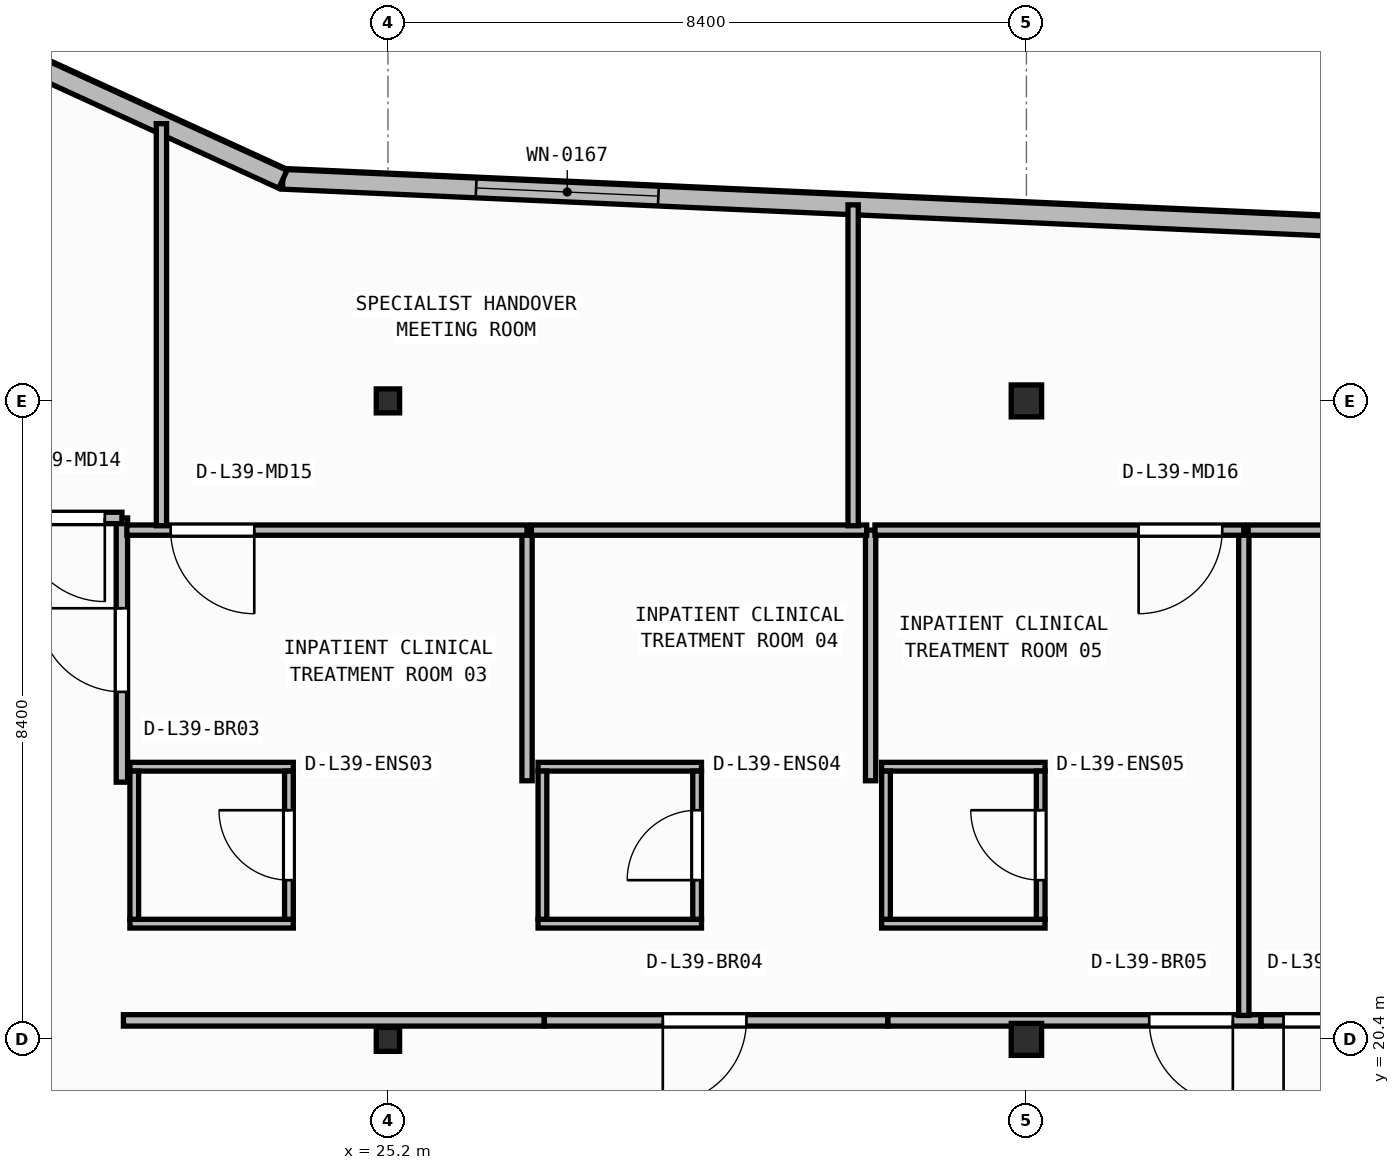
"""IFC4 building model, lengths in metres.
Left out: names, types, materials, properties, quantities, classifications, styles, units other than length and angle.
Written with IfcOpenShell. Run it as: python <this file> out.ifc"""

import sys

from ifc_helpers import new_model, si_unit, direction, frame, frame_2d, origin, origin_2d, place, context, subcontext, project, spatial, rectangle, i_section, extrude, element, fill, save


model = new_model("IFC4")
c1 = context("Model", 3, precision=1e-05, world=origin(), true_north=direction((0.0, 1.0)))
c2 = subcontext(c1, "Body", "Model", "MODEL_VIEW")
j1 = project(units=[si_unit("LENGTHUNIT", "METRE"), si_unit("PLANEANGLEUNIT", "RADIAN")], contexts=[c1])
p1 = place(None, origin())
s1 = spatial("IfcSite", under=j1, at=p1, CompositionType="ELEMENT")
p2 = place(p1, origin())
s2 = spatial("IfcBuilding", under=s1, at=p2, CompositionType="ELEMENT")
p3 = place(p2, frame((0.0, 0.0, 158.65)))
s3 = spatial("IfcBuildingStorey", under=s2, at=p3, CompositionType="ELEMENT", Elevation=158.65)
p4 = place(p3, frame((25.2, 20.4, 0.0), z_axis=(0.0, 0.0, 1.0), x_axis=(1.0, 0.0, 0.0)))
e1 = element("IfcColumn", 1, at=p4, inside=s3, PredefinedType="COLUMN", context=c2, shape_type="SweptSolid", body=[
    extrude(i_section(OverallWidth=0.307, OverallDepth=0.315, WebThickness=0.012, FlangeThickness=0.019, FilletRadius=0.017, at=origin_2d()), origin(), (0.0, 0.0, 1.0), 3.95),
])
p5 = place(p3, frame((33.6, 20.4, 0.0), z_axis=(0.0, 0.0, 1.0), x_axis=(1.0, 0.0, 0.0)))
e2 = element("IfcColumn", 2, at=p5, inside=s3, PredefinedType="COLUMN", context=c2, shape_type="SweptSolid", body=[
    extrude(i_section(OverallWidth=0.4, OverallDepth=0.42, WebThickness=0.025, FlangeThickness=0.04, at=origin_2d()), origin(), (0.0, 0.0, 1.0), 3.95),
])
p6 = place(p3, frame((25.2, 28.8, 0.0), z_axis=(0.0, 0.0, 1.0), x_axis=(1.0, 0.0, 0.0)))
e3 = element("IfcColumn", 3, at=p6, inside=s3, PredefinedType="COLUMN", context=c2, shape_type="SweptSolid", body=[
    extrude(i_section(OverallWidth=0.307, OverallDepth=0.315, WebThickness=0.012, FlangeThickness=0.019, FilletRadius=0.017, at=origin_2d()), origin(), (0.0, 0.0, 1.0), 3.95),
])
p7 = place(p3, frame((33.6, 28.8, 0.0), z_axis=(0.0, 0.0, 1.0), x_axis=(1.0, 0.0, 0.0)))
e4 = element("IfcColumn", 4, at=p7, inside=s3, PredefinedType="COLUMN", context=c2, shape_type="SweptSolid", body=[
    extrude(i_section(OverallWidth=0.4, OverallDepth=0.42, WebThickness=0.025, FlangeThickness=0.04, at=origin_2d()), origin(), (0.0, 0.0, 1.0), 3.95),
])
p8 = place(p3, frame((38.63, 31.052, 0.0), z_axis=(0.0, 0.0, 1.0), x_axis=(-0.998996592956, 0.044786239663, 0.0)))
e5 = element("IfcWall", 5, at=p8, inside=s3, PredefinedType="STANDARD", context=c2, shape_type="SweptSolid", body=[
    extrude(rectangle(XDim=14.827, YDim=0.26, at=frame_2d((7.414, 0.0))), origin(), (0.0, 0.0, 1.0), 3.71),
])
p9 = place(p8, frame((9.882, 0.0, 0.9)))
e6 = element("IfcOpeningElement", 6, at=p9, cuts=e5, PredefinedType="OPENING", context=c2, shape_type="SweptSolid", body=[
    extrude(rectangle(XDim=2.4, YDim=1.65, at=frame_2d((1.2, 0.825))), frame((0.0, 0.14, 0.0), z_axis=(0.0, -1.0, 0.0), x_axis=(1.0, 0.0, 0.0)), (0.0, 0.0, 1.0), 0.28),
])
p10 = place(p3, frame((23.818, 31.716, 0.0), z_axis=(0.0, 0.0, 1.0), x_axis=(-0.909209527513, 0.416338846471, 0.0)))
e7 = element("IfcWall", 7, at=p10, inside=s3, PredefinedType="STANDARD", context=c2, shape_type="SweptSolid", body=[
    extrude(rectangle(XDim=13.787, YDim=0.26, at=frame_2d((6.894, 0.0))), origin(), (0.0, 0.0, 1.0), 3.71),
])
p11 = place(p10, frame((3.829, 0.0, 0.9)))
e8 = element("IfcOpeningElement", 8, at=p11, cuts=e7, PredefinedType="OPENING", context=c2, shape_type="SweptSolid", body=[
    extrude(rectangle(XDim=2.4, YDim=1.65, at=frame_2d((1.2, 0.825))), frame((0.0, 0.14, 0.0), z_axis=(0.0, -1.0, 0.0), x_axis=(1.0, 0.0, 0.0)), (0.0, 0.0, 1.0), 0.28),
])
for number, where, z_axis, x_axis in (
    (9, (21.805, 21.923, 0.0), (0.0, 0.0, 1.0), (1.0, 0.0, 0.0)),
    (10, (21.805, 23.988, 0.0), (0.0, 0.0, 1.0), (1.0, 0.0, 0.0)),
):
    element("IfcWall", number, at=place(p3, frame(where, z_axis=z_axis, x_axis=x_axis)), inside=s3, PredefinedType="PARTITIONING", context=c2, shape_type="SweptSolid", body=[
        extrude(rectangle(XDim=2.15, YDim=0.115, at=frame_2d((1.075, 0.0))), origin(), (0.0, 0.0, 1.0), 3.71),
    ])
p12 = place(p3, frame((21.863, 21.98, 0.0), z_axis=(0.0, 0.0, 1.0), x_axis=(0.0, 1.0, 0.0)))
e11 = element("IfcWall", 11, at=p12, inside=s3, PredefinedType="PARTITIONING", context=c2, shape_type="SweptSolid", body=[
    extrude(rectangle(XDim=1.95, YDim=0.115, at=frame_2d((0.975, 0.0))), origin(), (0.0, 0.0, 1.0), 3.71),
])
p13 = place(p3, frame((23.897, 21.98, 0.0), z_axis=(0.0, 0.0, 1.0), x_axis=(0.0, 1.0, 0.0)))
e12 = element("IfcWall", 12, at=p13, inside=s3, PredefinedType="PARTITIONING", context=c2, shape_type="SweptSolid", body=[
    extrude(rectangle(XDim=1.95, YDim=0.115, at=frame_2d((0.975, 0.0))), origin(), (0.0, 0.0, 1.0), 3.71),
])
p14 = place(p13, frame((0.515, 0.0, 0.0)))
e13 = element("IfcOpeningElement", 13, at=p14, cuts=e12, PredefinedType="OPENING", context=c2, shape_type="SweptSolid", body=[
    extrude(rectangle(XDim=0.92, YDim=2.1, at=frame_2d((0.46, 1.05))), frame((0.0, 0.067, 0.0), z_axis=(0.0, -1.0, 0.0), x_axis=(1.0, 0.0, 0.0)), (0.0, 0.0, 1.0), 0.135),
])
for number, where, z_axis, x_axis in (
    (14, (27.175, 21.923, 0.0), (0.0, 0.0, 1.0), (1.0, 0.0, 0.0)),
    (15, (27.175, 23.988, 0.0), (0.0, 0.0, 1.0), (1.0, 0.0, 0.0)),
):
    element("IfcWall", number, at=place(p3, frame(where, z_axis=z_axis, x_axis=x_axis)), inside=s3, PredefinedType="PARTITIONING", context=c2, shape_type="SweptSolid", body=[
        extrude(rectangle(XDim=2.15, YDim=0.115, at=frame_2d((1.075, 0.0))), origin(), (0.0, 0.0, 1.0), 3.71),
    ])
p15 = place(p3, frame((27.232, 21.98, 0.0), z_axis=(0.0, 0.0, 1.0), x_axis=(0.0, 1.0, 0.0)))
e16 = element("IfcWall", 16, at=p15, inside=s3, PredefinedType="PARTITIONING", context=c2, shape_type="SweptSolid", body=[
    extrude(rectangle(XDim=1.95, YDim=0.115, at=frame_2d((0.975, 0.0))), origin(), (0.0, 0.0, 1.0), 3.71),
])
p16 = place(p3, frame((29.268, 21.98, 0.0), z_axis=(0.0, 0.0, 1.0), x_axis=(0.0, 1.0, 0.0)))
e17 = element("IfcWall", 17, at=p16, inside=s3, PredefinedType="PARTITIONING", context=c2, shape_type="SweptSolid", body=[
    extrude(rectangle(XDim=1.95, YDim=0.115, at=frame_2d((0.975, 0.0))), origin(), (0.0, 0.0, 1.0), 3.71),
])
p17 = place(p16, frame((0.515, 0.0, 0.0)))
e18 = element("IfcOpeningElement", 18, at=p17, cuts=e17, PredefinedType="OPENING", context=c2, shape_type="SweptSolid", body=[
    extrude(rectangle(XDim=0.92, YDim=2.1, at=frame_2d((0.46, 1.05))), frame((0.0, 0.067, 0.0), z_axis=(0.0, -1.0, 0.0), x_axis=(1.0, 0.0, 0.0)), (0.0, 0.0, 1.0), 0.135),
])
for number, where, z_axis, x_axis in (
    (19, (31.695, 21.923, 0.0), (0.0, 0.0, 1.0), (1.0, 0.0, 0.0)),
    (20, (31.695, 23.988, 0.0), (0.0, 0.0, 1.0), (1.0, 0.0, 0.0)),
):
    element("IfcWall", number, at=place(p3, frame(where, z_axis=z_axis, x_axis=x_axis)), inside=s3, PredefinedType="PARTITIONING", context=c2, shape_type="SweptSolid", body=[
        extrude(rectangle(XDim=2.15, YDim=0.115, at=frame_2d((1.075, 0.0))), origin(), (0.0, 0.0, 1.0), 3.71),
    ])
p18 = place(p3, frame((31.752, 21.98, 0.0), z_axis=(0.0, 0.0, 1.0), x_axis=(0.0, 1.0, 0.0)))
e21 = element("IfcWall", 21, at=p18, inside=s3, PredefinedType="PARTITIONING", context=c2, shape_type="SweptSolid", body=[
    extrude(rectangle(XDim=1.95, YDim=0.115, at=frame_2d((0.975, 0.0))), origin(), (0.0, 0.0, 1.0), 3.71),
])
p19 = place(p3, frame((33.788, 21.98, 0.0), z_axis=(0.0, 0.0, 1.0), x_axis=(0.0, 1.0, 0.0)))
e22 = element("IfcWall", 22, at=p19, inside=s3, PredefinedType="PARTITIONING", context=c2, shape_type="SweptSolid", body=[
    extrude(rectangle(XDim=1.95, YDim=0.115, at=frame_2d((0.975, 0.0))), origin(), (0.0, 0.0, 1.0), 3.152),
])
p20 = place(p19, frame((0.515, 0.0, 0.0)))
e23 = element("IfcOpeningElement", 23, at=p20, cuts=e22, PredefinedType="OPENING", context=c2, shape_type="SweptSolid", body=[
    extrude(rectangle(XDim=0.92, YDim=2.1, at=frame_2d((0.46, 1.05))), frame((0.0, 0.067, 0.0), z_axis=(0.0, -1.0, 0.0), x_axis=(1.0, 0.0, 0.0)), (0.0, 0.0, 1.0), 0.135),
])
p21 = place(p3, frame((21.7, 23.784, 0.0), z_axis=(0.0, 0.0, 1.0), x_axis=(0.0, 1.0, 0.0)))
e24 = element("IfcWall", 24, at=p21, inside=s3, PredefinedType="PARTITIONING", context=c2, shape_type="SweptSolid", body=[
    extrude(rectangle(XDim=3.476, YDim=0.15, at=frame_2d((1.738, 0.0))), origin(), (0.0, 0.0, 1.0), 3.71),
])
p22 = place(p21, frame((1.188, 0.0, 0.0)))
e25 = element("IfcOpeningElement", 25, at=p22, cuts=e24, PredefinedType="OPENING", context=c2, shape_type="SweptSolid", body=[
    extrude(rectangle(XDim=1.1, YDim=2.1, at=frame_2d((0.55, 1.05))), frame((0.0, 0.085, 0.0), z_axis=(0.0, -1.0, 0.0), x_axis=(1.0, 0.0, 0.0)), (0.0, 0.0, 1.0), 0.17),
])
p23 = place(p3, frame((21.7, 27.26, 0.0), z_axis=(0.0, 0.0, 1.0), x_axis=(-1.0, 0.0, 0.0)))
e26 = element("IfcWall", 26, at=p23, inside=s3, PredefinedType="PARTITIONING", context=c2, shape_type="SweptSolid", body=[
    extrude(rectangle(XDim=2.5, YDim=0.15, at=frame_2d((1.25, 0.0))), origin(), (0.0, 0.0, 1.0), 3.71),
])
p24 = place(p23, frame((0.225, 0.0, 0.0)))
e27 = element("IfcOpeningElement", 27, at=p24, cuts=e26, PredefinedType="OPENING", context=c2, shape_type="SweptSolid", body=[
    extrude(rectangle(XDim=1.1, YDim=2.1, at=frame_2d((0.55, 1.05))), frame((0.0, 0.085, 0.0), z_axis=(0.0, -1.0, 0.0), x_axis=(1.0, 0.0, 0.0)), (0.0, 0.0, 1.0), 0.17),
])
p25 = place(p3, frame((27.256, 20.65, 0.0), z_axis=(0.0, 0.0, 1.0), x_axis=(-1.0, 0.0, 0.0)))
e28 = element("IfcWall", 28, at=p25, inside=s3, PredefinedType="PARTITIONING", context=c2, shape_type="SweptSolid", body=[
    extrude(rectangle(XDim=5.536, YDim=0.15, at=frame_2d((2.768, 0.0))), origin(), (0.0, 0.0, 1.0), 3.083),
])
p26 = place(p3, frame((31.776, 20.65, 0.0), z_axis=(0.0, 0.0, 1.0), x_axis=(-1.0, 0.0, 0.0)))
e29 = element("IfcWall", 29, at=p26, inside=s3, PredefinedType="PARTITIONING", context=c2, shape_type="SweptSolid", body=[
    extrude(rectangle(XDim=4.518, YDim=0.15, at=frame_2d((2.259, 0.0))), origin(), (0.0, 0.0, 1.0), 3.083),
])
p27 = place(p26, frame((1.86, 0.0, 0.0)))
e30 = element("IfcOpeningElement", 30, at=p27, cuts=e29, PredefinedType="OPENING", context=c2, shape_type="SweptSolid", body=[
    extrude(rectangle(XDim=1.1, YDim=2.1, at=frame_2d((0.55, 1.05))), frame((0.0, 0.085, 0.0), z_axis=(0.0, -1.0, 0.0), x_axis=(1.0, 0.0, 0.0)), (0.0, 0.0, 1.0), 0.17),
])
p28 = place(p3, frame((36.686, 20.65, 0.0), z_axis=(0.0, 0.0, 1.0), x_axis=(-1.0, 0.0, 0.0)))
e31 = element("IfcWall", 31, at=p28, inside=s3, PredefinedType="PARTITIONING", context=c2, shape_type="SweptSolid", body=[
    extrude(rectangle(XDim=4.908, YDim=0.15, at=frame_2d((2.454, 0.0))), origin(), (0.0, 0.0, 1.0), 3.083),
])
p29 = place(p28, frame((0.37, 0.0, 0.0)))
e32 = element("IfcOpeningElement", 32, at=p29, cuts=e31, PredefinedType="OPENING", context=c2, shape_type="SweptSolid", body=[
    extrude(rectangle(XDim=1.1, YDim=2.1, at=frame_2d((0.55, 1.05))), frame((0.0, 0.085, 0.0), z_axis=(0.0, -1.0, 0.0), x_axis=(1.0, 0.0, 0.0)), (0.0, 0.0, 1.0), 0.17),
])
p30 = place(p3, frame((41.996, 20.65, 0.0), z_axis=(0.0, 0.0, 1.0), x_axis=(-1.0, 0.0, 0.0)))
e33 = element("IfcWall", 33, at=p30, inside=s3, PredefinedType="PARTITIONING", context=c2, shape_type="SweptSolid", body=[
    extrude(rectangle(XDim=5.308, YDim=0.15, at=frame_2d((2.654, 0.0))), origin(), (0.0, 0.0, 1.0), 3.083),
])
p31 = place(p30, frame((3.913, 0.0, 0.0)))
e34 = element("IfcOpeningElement", 34, at=p31, cuts=e33, PredefinedType="OPENING", context=c2, shape_type="SweptSolid", body=[
    extrude(rectangle(XDim=1.1, YDim=2.1, at=frame_2d((0.55, 1.05))), frame((0.0, 0.085, 0.0), z_axis=(0.0, -1.0, 0.0), x_axis=(1.0, 0.0, 0.0)), (0.0, 0.0, 1.0), 0.17),
])
p32 = place(p3, frame((27.03, 23.802, 0.0), z_axis=(0.0, 0.0, 1.0), x_axis=(0.0, 1.0, 0.0)))
e35 = element("IfcWall", 35, at=p32, inside=s3, PredefinedType="PARTITIONING", context=c2, shape_type="SweptSolid", body=[
    extrude(rectangle(XDim=3.298, YDim=0.135, at=frame_2d((1.649, 0.0))), origin(), (0.0, 0.0, 1.0), 3.71),
])
p33 = place(p3, frame((27.03, 27.1, 0.0), z_axis=(0.0, 0.0, 1.0), x_axis=(-1.0, 0.0, 0.0)))
e36 = element("IfcWall", 36, at=p33, inside=s3, PredefinedType="PARTITIONING", context=c2, shape_type="SweptSolid", body=[
    extrude(rectangle(XDim=5.265, YDim=0.135, at=frame_2d((2.633, 0.0))), origin(), (0.0, 0.0, 1.0), 3.71),
])
p34 = place(p33, frame((3.588, 0.0, 0.0)))
e37 = element("IfcOpeningElement", 37, at=p34, cuts=e36, PredefinedType="OPENING", context=c2, shape_type="SweptSolid", body=[
    extrude(rectangle(XDim=1.1, YDim=2.1, at=frame_2d((0.55, 1.05))), frame((0.0, 0.077, 0.0), z_axis=(0.0, -1.0, 0.0), x_axis=(1.0, 0.0, 0.0)), (0.0, 0.0, 1.0), 0.155),
])
p35 = place(p3, frame((31.55, 23.802, 0.0), z_axis=(0.0, 0.0, 1.0), x_axis=(0.0, 1.0, 0.0)))
e38 = element("IfcWall", 38, at=p35, inside=s3, PredefinedType="PARTITIONING", context=c2, shape_type="SweptSolid", body=[
    extrude(rectangle(XDim=3.298, YDim=0.135, at=frame_2d((1.649, 0.0))), origin(), (0.0, 0.0, 1.0), 3.71),
])
p36 = place(p3, frame((31.499, 27.1, 0.0), z_axis=(0.0, 0.0, 1.0), x_axis=(-1.0, 0.0, 0.0)))
e39 = element("IfcWall", 39, at=p36, inside=s3, PredefinedType="PARTITIONING", context=c2, shape_type="SweptSolid", body=[
    extrude(rectangle(XDim=4.411, YDim=0.135, at=frame_2d((2.206, 0.0))), origin(), (0.0, 0.0, 1.0), 3.71),
])
p37 = place(p3, frame((36.46, 20.715, 0.0), z_axis=(0.0, 0.0, 1.0), x_axis=(0.0, 1.0, 0.0)))
e40 = element("IfcWall", 40, at=p37, inside=s3, PredefinedType="PARTITIONING", context=c2, shape_type="SweptSolid", body=[
    extrude(rectangle(XDim=6.385, YDim=0.135, at=frame_2d((3.192, 0.0))), origin(), (0.0, 0.0, 1.0), 3.71),
])
p38 = place(p3, frame((36.46, 27.1, 0.0), z_axis=(0.0, 0.0, 1.0), x_axis=(-1.0, 0.0, 0.0)))
e41 = element("IfcWall", 41, at=p38, inside=s3, PredefinedType="PARTITIONING", context=c2, shape_type="SweptSolid", body=[
    extrude(rectangle(XDim=4.853, YDim=0.135, at=frame_2d((2.426, 0.0))), origin(), (0.0, 0.0, 1.0), 3.71),
])
p39 = place(p38, frame((0.284, 0.0, 0.0)))
e42 = element("IfcOpeningElement", 42, at=p39, cuts=e41, PredefinedType="OPENING", context=c2, shape_type="SweptSolid", body=[
    extrude(rectangle(XDim=1.1, YDim=2.1, at=frame_2d((0.55, 1.05))), frame((0.0, 0.077, 0.0), z_axis=(0.0, -1.0, 0.0), x_axis=(1.0, 0.0, 0.0)), (0.0, 0.0, 1.0), 0.155),
])
p40 = place(p3, frame((41.77, 27.1, 0.0), z_axis=(0.0, 0.0, 1.0), x_axis=(-1.0, 0.0, 0.0)))
e43 = element("IfcWall", 43, at=p40, inside=s3, PredefinedType="PARTITIONING", context=c2, shape_type="SweptSolid", body=[
    extrude(rectangle(XDim=5.252, YDim=0.135, at=frame_2d((2.626, 0.0))), origin(), (0.0, 0.0, 1.0), 3.71),
])
p41 = place(p3, frame((22.22, 27.157, 0.0), z_axis=(0.0, 0.0, 1.0), x_axis=(0.0, 1.0, 0.0)))
e44 = element("IfcWall", 44, at=p41, inside=s3, PredefinedType="PARTITIONING", context=c2, shape_type="SweptSolid", body=[
    extrude(rectangle(XDim=5.29, YDim=0.135, at=frame_2d((2.645, 0.0))), origin(), (0.0, 0.0, 1.0), 3.71),
])
p42 = place(p3, frame((31.32, 27.157, 0.0), z_axis=(0.0, 0.0, 1.0), x_axis=(0.0, 1.0, 0.0)))
e45 = element("IfcWall", 45, at=p42, inside=s3, PredefinedType="PARTITIONING", context=c2, shape_type="SweptSolid", body=[
    extrude(rectangle(XDim=4.222, YDim=0.135, at=frame_2d((2.111, 0.0))), origin(), (0.0, 0.0, 1.0), 3.71),
])
p43 = place(p9, origin())
e46 = element("IfcWindow", 46, at=p43, inside=s3, PartitioningType="SINGLE_PANEL", PredefinedType="WINDOW", context=c2, shape_type="SweptSolid", body=[
    extrude(rectangle(XDim=2.4, YDim=1.65, at=frame_2d((1.2, 0.825))), frame((0.0, 0.03, 0.0), z_axis=(0.0, -1.0, 0.0), x_axis=(1.0, 0.0, 0.0)), (0.0, 0.0, 1.0), 0.06),
])
fill(e6, e46)
p44 = place(p14, origin())
e47 = element("IfcDoor", 47, at=p44, inside=s3, OperationType="SINGLE_SWING_RIGHT", PredefinedType="DOOR", context=c2, shape_type="SweptSolid", body=[
    extrude(rectangle(XDim=0.92, YDim=2.1, at=frame_2d((0.46, 1.05))), frame((0.0, 0.025, 0.0), z_axis=(0.0, -1.0, 0.0), x_axis=(1.0, 0.0, 0.0)), (0.0, 0.0, 1.0), 0.05),
])
fill(e13, e47)
p45 = place(p17, origin())
e48 = element("IfcDoor", 48, at=p45, inside=s3, OperationType="SINGLE_SWING_LEFT", PredefinedType="DOOR", context=c2, shape_type="SweptSolid", body=[
    extrude(rectangle(XDim=0.92, YDim=2.1, at=frame_2d((0.46, 1.05))), frame((0.0, 0.025, 0.0), z_axis=(0.0, -1.0, 0.0), x_axis=(1.0, 0.0, 0.0)), (0.0, 0.0, 1.0), 0.05),
])
fill(e18, e48)
p46 = place(p20, origin())
e49 = element("IfcDoor", 49, at=p46, inside=s3, OperationType="SINGLE_SWING_RIGHT", PredefinedType="DOOR", context=c2, shape_type="SweptSolid", body=[
    extrude(rectangle(XDim=0.92, YDim=2.1, at=frame_2d((0.46, 1.05))), frame((0.0, 0.025, 0.0), z_axis=(0.0, -1.0, 0.0), x_axis=(1.0, 0.0, 0.0)), (0.0, 0.0, 1.0), 0.05),
])
fill(e23, e49)
p47 = place(p22, origin())
e50 = element("IfcDoor", 50, at=p47, inside=s3, OperationType="SINGLE_SWING_RIGHT", PredefinedType="DOOR", context=c2, shape_type="SweptSolid", body=[
    extrude(rectangle(XDim=1.1, YDim=2.1, at=frame_2d((0.55, 1.05))), frame((0.0, 0.025, 0.0), z_axis=(0.0, -1.0, 0.0), x_axis=(1.0, 0.0, 0.0)), (0.0, 0.0, 1.0), 0.05),
])
fill(e25, e50)
p48 = place(p24, origin())
e51 = element("IfcDoor", 51, at=p48, inside=s3, OperationType="SINGLE_SWING_LEFT", PredefinedType="DOOR", context=c2, shape_type="SweptSolid", body=[
    extrude(rectangle(XDim=1.1, YDim=2.1, at=frame_2d((0.55, 1.05))), frame((0.0, 0.025, 0.0), z_axis=(0.0, -1.0, 0.0), x_axis=(1.0, 0.0, 0.0)), (0.0, 0.0, 1.0), 0.05),
])
fill(e27, e51)
p49 = place(p27, origin())
e52 = element("IfcDoor", 52, at=p49, inside=s3, OperationType="SINGLE_SWING_RIGHT", PredefinedType="DOOR", context=c2, shape_type="SweptSolid", body=[
    extrude(rectangle(XDim=1.1, YDim=2.1, at=frame_2d((0.55, 1.05))), frame((0.0, 0.025, 0.0), z_axis=(0.0, -1.0, 0.0), x_axis=(1.0, 0.0, 0.0)), (0.0, 0.0, 1.0), 0.05),
])
fill(e30, e52)
p50 = place(p29, origin())
e53 = element("IfcDoor", 53, at=p50, inside=s3, OperationType="SINGLE_SWING_LEFT", PredefinedType="DOOR", context=c2, shape_type="SweptSolid", body=[
    extrude(rectangle(XDim=1.1, YDim=2.1, at=frame_2d((0.55, 1.05))), frame((0.0, 0.025, 0.0), z_axis=(0.0, -1.0, 0.0), x_axis=(1.0, 0.0, 0.0)), (0.0, 0.0, 1.0), 0.05),
])
fill(e32, e53)
p51 = place(p31, origin())
e54 = element("IfcDoor", 54, at=p51, inside=s3, OperationType="SINGLE_SWING_RIGHT", PredefinedType="DOOR", context=c2, shape_type="SweptSolid", body=[
    extrude(rectangle(XDim=1.1, YDim=2.1, at=frame_2d((0.55, 1.05))), frame((0.0, 0.025, 0.0), z_axis=(0.0, -1.0, 0.0), x_axis=(1.0, 0.0, 0.0)), (0.0, 0.0, 1.0), 0.05),
])
fill(e34, e54)
p52 = place(p34, origin())
e55 = element("IfcDoor", 55, at=p52, inside=s3, OperationType="SINGLE_SWING_LEFT", PredefinedType="DOOR", context=c2, shape_type="SweptSolid", body=[
    extrude(rectangle(XDim=1.1, YDim=2.1, at=frame_2d((0.55, 1.05))), frame((0.0, 0.025, 0.0), z_axis=(0.0, -1.0, 0.0), x_axis=(1.0, 0.0, 0.0)), (0.0, 0.0, 1.0), 0.05),
])
fill(e37, e55)
p53 = place(p39, origin())
e56 = element("IfcDoor", 56, at=p53, inside=s3, OperationType="SINGLE_SWING_RIGHT", PredefinedType="DOOR", context=c2, shape_type="SweptSolid", body=[
    extrude(rectangle(XDim=1.1, YDim=2.1, at=frame_2d((0.55, 1.05))), frame((0.0, 0.025, 0.0), z_axis=(0.0, -1.0, 0.0), x_axis=(1.0, 0.0, 0.0)), (0.0, 0.0, 1.0), 0.05),
])
fill(e42, e56)
save(model, sys.argv[1])
